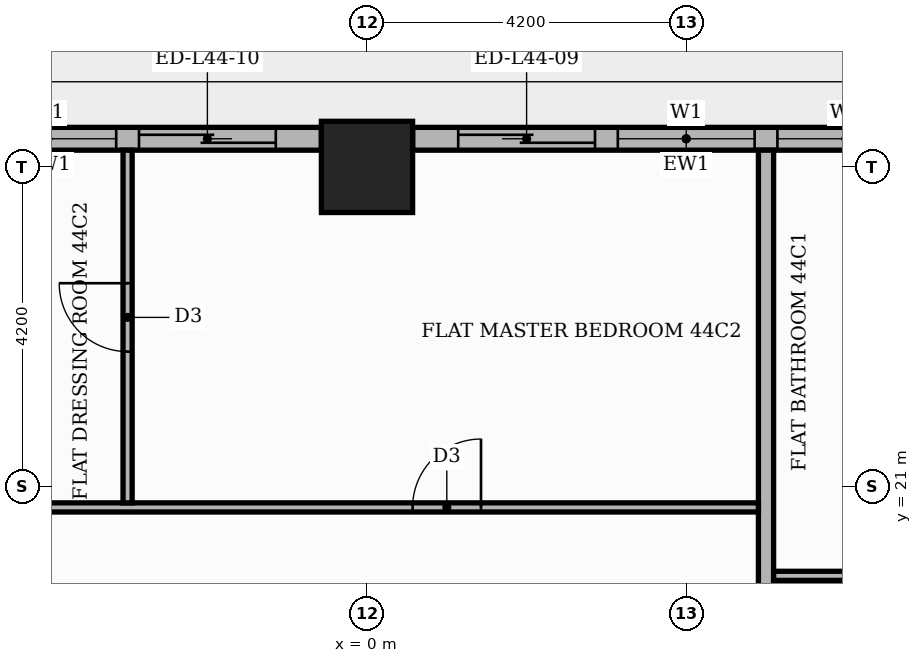
"""IFC4 building model, lengths in metres.
Left out: names, types, materials, properties, quantities, classifications, styles, units other than length and angle.
Written with IfcOpenShell. Run it as: python <this file> out.ifc"""

import sys

from ifc_helpers import new_model, si_unit, direction, frame, frame_2d, origin, origin_2d, place, context, subcontext, project, spatial, rectangle, extrude, element, fill, save


model = new_model("IFC4")
c1 = context("Model", 3, precision=1e-05, world=origin(), true_north=direction((0.0, 1.0)))
c2 = subcontext(c1, "Body", "Model", "MODEL_VIEW")
j1 = project(units=[si_unit("LENGTHUNIT", "METRE"), si_unit("PLANEANGLEUNIT", "RADIAN")], contexts=[c1])
p1 = place(None, origin())
s1 = spatial("IfcSite", under=j1, at=p1, CompositionType="ELEMENT")
p2 = place(p1, origin())
s2 = spatial("IfcBuilding", under=s1, at=p2, CompositionType="ELEMENT")
p3 = place(p2, frame((0.0, 0.0, 188.4)))
s3 = spatial("IfcBuildingStorey", under=s2, at=p3, CompositionType="ELEMENT", Elevation=188.4)
p4 = place(p3, frame((0.0, 25.2, -0.42), z_axis=(0.0, 0.0, 1.0), x_axis=(1.0, 0.0, 0.0)))
e1 = element("IfcColumn", 1, at=p4, inside=s3, PredefinedType="COLUMN", context=c2, shape_type="SweptSolid", body=[
    extrude(rectangle(XDim=1.2, YDim=1.2, at=origin_2d()), origin(), (0.0, 0.0, 1.0), 4.32),
])
p5 = place(p3, frame((7.8, 25.57, 0.0), z_axis=(0.0, 0.0, 1.0), x_axis=(-1.0, 0.0, 0.0)))
e2 = element("IfcWall", 2, at=p5, inside=s3, PredefinedType="STANDARD", context=c2, shape_type="SweptSolid", body=[
    extrude(rectangle(XDim=7.2, YDim=0.3, at=frame_2d((3.6, 0.0))), origin(), (0.0, 0.0, 1.0), 3.48),
])
p6 = place(p5, frame((0.6, 0.0, 0.9)))
e3 = element("IfcOpeningElement", 3, at=p6, cuts=e2, PredefinedType="OPENING", context=c2, shape_type="SweptSolid", body=[
    extrude(rectangle(XDim=1.8, YDim=2.1, at=frame_2d((0.9, 1.05))), frame((0.0, 0.16, 0.0), z_axis=(0.0, -1.0, 0.0), x_axis=(1.0, 0.0, 0.0)), (0.0, 0.0, 1.0), 0.32),
])
p7 = place(p5, frame((2.7, 0.0, 0.9)))
e4 = element("IfcOpeningElement", 4, at=p7, cuts=e2, PredefinedType="OPENING", context=c2, shape_type="SweptSolid", body=[
    extrude(rectangle(XDim=1.8, YDim=2.1, at=frame_2d((0.9, 1.05))), frame((0.0, 0.16, 0.0), z_axis=(0.0, -1.0, 0.0), x_axis=(1.0, 0.0, 0.0)), (0.0, 0.0, 1.0), 0.32),
])
p8 = place(p5, frame((4.8, 0.0, 0.0)))
e5 = element("IfcOpeningElement", 5, at=p8, cuts=e2, PredefinedType="OPENING", context=c2, shape_type="SweptSolid", body=[
    extrude(rectangle(XDim=1.8, YDim=2.4, at=frame_2d((0.9, 1.2))), frame((0.0, 0.16, 0.0), z_axis=(0.0, -1.0, 0.0), x_axis=(1.0, 0.0, 0.0)), (0.0, 0.0, 1.0), 0.32),
])
p9 = place(p3, frame((-0.6, 25.57, 0.0), z_axis=(0.0, 0.0, 1.0), x_axis=(-1.0, 0.0, 0.0)))
e6 = element("IfcWall", 6, at=p9, inside=s3, PredefinedType="STANDARD", context=c2, shape_type="SweptSolid", body=[
    extrude(rectangle(XDim=7.2, YDim=0.3, at=frame_2d((3.6, 0.0))), origin(), (0.0, 0.0, 1.0), 3.48),
])
p10 = place(p9, frame((0.6, 0.0, 0.0)))
e7 = element("IfcOpeningElement", 7, at=p10, cuts=e6, PredefinedType="OPENING", context=c2, shape_type="SweptSolid", body=[
    extrude(rectangle(XDim=1.8, YDim=2.4, at=frame_2d((0.9, 1.2))), frame((0.0, 0.16, 0.0), z_axis=(0.0, -1.0, 0.0), x_axis=(1.0, 0.0, 0.0)), (0.0, 0.0, 1.0), 0.32),
])
p11 = place(p9, frame((2.7, 0.0, 0.9)))
e8 = element("IfcOpeningElement", 8, at=p11, cuts=e6, PredefinedType="OPENING", context=c2, shape_type="SweptSolid", body=[
    extrude(rectangle(XDim=1.8, YDim=2.1, at=frame_2d((0.9, 1.05))), frame((0.0, 0.16, 0.0), z_axis=(0.0, -1.0, 0.0), x_axis=(1.0, 0.0, 0.0)), (0.0, 0.0, 1.0), 0.32),
])
p12 = place(p9, frame((4.8, 0.0, 0.9)))
e9 = element("IfcOpeningElement", 9, at=p12, cuts=e6, PredefinedType="OPENING", context=c2, shape_type="SweptSolid", body=[
    extrude(rectangle(XDim=1.8, YDim=2.1, at=frame_2d((0.9, 1.05))), frame((0.0, 0.16, 0.0), z_axis=(0.0, -1.0, 0.0), x_axis=(1.0, 0.0, 0.0)), (0.0, 0.0, 1.0), 0.32),
])
p13 = place(p3, frame((5.25, 13.75, 0.0), z_axis=(0.0, 0.0, 1.0), x_axis=(0.0, 1.0, 0.0)))
e10 = element("IfcWall", 10, at=p13, inside=s3, PredefinedType="PARTITIONING", context=c2, shape_type="SweptSolid", body=[
    extrude(rectangle(XDim=11.67, YDim=0.2, at=frame_2d((5.835, 0.0))), origin(), (0.0, 0.0, 1.0), 3.48),
])
p14 = place(p3, frame((5.35, 19.82, 0.0), z_axis=(0.0, 0.0, 1.0), x_axis=(1.0, 0.0, 0.0)))
e11 = element("IfcWall", 11, at=p14, inside=s3, PredefinedType="PARTITIONING", context=c2, shape_type="SweptSolid", body=[
    extrude(rectangle(XDim=12.25, YDim=0.12, at=frame_2d((6.125, 0.0))), origin(), (0.0, 0.0, 1.0), 3.48),
])
p15 = place(p14, frame((8.85, 0.0, 0.0)))
e12 = element("IfcOpeningElement", 12, at=p15, cuts=e11, PredefinedType="OPENING", context=c2, shape_type="SweptSolid", body=[
    extrude(rectangle(XDim=1.0, YDim=2.1, at=frame_2d((0.5, 1.05))), frame((0.0, 0.07, 0.0), z_axis=(0.0, -1.0, 0.0), x_axis=(1.0, 0.0, 0.0)), (0.0, 0.0, 1.0), 0.14),
])
p16 = place(p14, frame((5.75, 0.0, 0.0)))
e13 = element("IfcOpeningElement", 13, at=p16, cuts=e11, PredefinedType="OPENING", context=c2, shape_type="SweptSolid", body=[
    extrude(rectangle(XDim=0.9, YDim=2.1, at=frame_2d((0.45, 1.05))), frame((0.0, 0.07, 0.0), z_axis=(0.0, -1.0, 0.0), x_axis=(1.0, 0.0, 0.0)), (0.0, 0.0, 1.0), 0.14),
])
p17 = place(p3, frame((-13.55, 20.72, 0.0), z_axis=(0.0, 0.0, 1.0), x_axis=(1.0, 0.0, 0.0)))
e14 = element("IfcWall", 14, at=p17, inside=s3, PredefinedType="PARTITIONING", context=c2, shape_type="SweptSolid", body=[
    extrude(rectangle(XDim=18.7, YDim=0.12, at=frame_2d((9.35, 0.0))), origin(), (0.0, 0.0, 1.0), 3.48),
])
p18 = place(p17, frame((14.15, 0.0, 0.0)))
e15 = element("IfcOpeningElement", 15, at=p18, cuts=e14, PredefinedType="OPENING", context=c2, shape_type="SweptSolid", body=[
    extrude(rectangle(XDim=0.9, YDim=2.1, at=frame_2d((0.45, 1.05))), frame((0.0, 0.07, 0.0), z_axis=(0.0, -1.0, 0.0), x_axis=(1.0, 0.0, 0.0)), (0.0, 0.0, 1.0), 0.14),
])
p19 = place(p17, frame((2.55, 0.0, 0.0)))
e16 = element("IfcOpeningElement", 16, at=p19, cuts=e14, PredefinedType="OPENING", context=c2, shape_type="SweptSolid", body=[
    extrude(rectangle(XDim=1.0, YDim=2.1, at=frame_2d((0.5, 1.05))), frame((0.0, 0.07, 0.0), z_axis=(0.0, -1.0, 0.0), x_axis=(1.0, 0.0, 0.0)), (0.0, 0.0, 1.0), 0.14),
])
p20 = place(p3, frame((-3.15, 20.78, 0.0), z_axis=(0.0, 0.0, 1.0), x_axis=(0.0, 1.0, 0.0)))
e17 = element("IfcWall", 17, at=p20, inside=s3, PredefinedType="PARTITIONING", context=c2, shape_type="SweptSolid", body=[
    extrude(rectangle(XDim=4.64, YDim=0.12, at=frame_2d((2.32, 0.0))), origin(), (0.0, 0.0, 1.0), 3.48),
])
p21 = place(p20, frame((1.99, 0.0, 0.0)))
e18 = element("IfcOpeningElement", 18, at=p21, cuts=e17, PredefinedType="OPENING", context=c2, shape_type="SweptSolid", body=[
    extrude(rectangle(XDim=0.9, YDim=2.1, at=frame_2d((0.45, 1.05))), frame((0.0, 0.07, 0.0), z_axis=(0.0, -1.0, 0.0), x_axis=(1.0, 0.0, 0.0)), (0.0, 0.0, 1.0), 0.14),
])
p22 = place(p6, origin())
e19 = element("IfcWindow", 19, at=p22, inside=s3, PartitioningType="SINGLE_PANEL", PredefinedType="WINDOW", context=c2, shape_type="SweptSolid", body=[
    extrude(rectangle(XDim=1.8, YDim=2.1, at=frame_2d((0.9, 1.05))), frame((0.0, 0.03, 0.0), z_axis=(0.0, -1.0, 0.0), x_axis=(1.0, 0.0, 0.0)), (0.0, 0.0, 1.0), 0.06),
])
fill(e3, e19)
p23 = place(p7, origin())
e20 = element("IfcWindow", 20, at=p23, inside=s3, PartitioningType="SINGLE_PANEL", PredefinedType="WINDOW", context=c2, shape_type="SweptSolid", body=[
    extrude(rectangle(XDim=1.8, YDim=2.1, at=frame_2d((0.9, 1.05))), frame((0.0, 0.03, 0.0), z_axis=(0.0, -1.0, 0.0), x_axis=(1.0, 0.0, 0.0)), (0.0, 0.0, 1.0), 0.06),
])
fill(e4, e20)
p24 = place(p8, origin())
e21 = element("IfcDoor", 21, at=p24, inside=s3, OperationType="SLIDING_TO_RIGHT", PredefinedType="DOOR", context=c2, shape_type="SweptSolid", body=[
    extrude(rectangle(XDim=1.8, YDim=2.4, at=frame_2d((0.9, 1.2))), frame((0.0, 0.025, 0.0), z_axis=(0.0, -1.0, 0.0), x_axis=(1.0, 0.0, 0.0)), (0.0, 0.0, 1.0), 0.05),
])
fill(e5, e21)
p25 = place(p10, origin())
e22 = element("IfcDoor", 22, at=p25, inside=s3, OperationType="SLIDING_TO_LEFT", PredefinedType="DOOR", context=c2, shape_type="SweptSolid", body=[
    extrude(rectangle(XDim=1.8, YDim=2.4, at=frame_2d((0.9, 1.2))), frame((0.0, 0.025, 0.0), z_axis=(0.0, -1.0, 0.0), x_axis=(1.0, 0.0, 0.0)), (0.0, 0.0, 1.0), 0.05),
])
fill(e7, e22)
p26 = place(p11, origin())
e23 = element("IfcWindow", 23, at=p26, inside=s3, PartitioningType="SINGLE_PANEL", PredefinedType="WINDOW", context=c2, shape_type="SweptSolid", body=[
    extrude(rectangle(XDim=1.8, YDim=2.1, at=frame_2d((0.9, 1.05))), frame((0.0, 0.03, 0.0), z_axis=(0.0, -1.0, 0.0), x_axis=(1.0, 0.0, 0.0)), (0.0, 0.0, 1.0), 0.06),
])
fill(e8, e23)
p27 = place(p18, origin())
e24 = element("IfcDoor", 24, at=p27, inside=s3, OperationType="SINGLE_SWING_RIGHT", PredefinedType="DOOR", context=c2, shape_type="SweptSolid", body=[
    extrude(rectangle(XDim=0.9, YDim=2.1, at=frame_2d((0.45, 1.05))), frame((0.0, 0.025, 0.0), z_axis=(0.0, -1.0, 0.0), x_axis=(1.0, 0.0, 0.0)), (0.0, 0.0, 1.0), 0.05),
])
fill(e15, e24)
p28 = place(p21, origin())
e25 = element("IfcDoor", 25, at=p28, inside=s3, OperationType="SINGLE_SWING_RIGHT", PredefinedType="DOOR", context=c2, shape_type="SweptSolid", body=[
    extrude(rectangle(XDim=0.9, YDim=2.1, at=frame_2d((0.45, 1.05))), frame((0.0, 0.025, 0.0), z_axis=(0.0, -1.0, 0.0), x_axis=(1.0, 0.0, 0.0)), (0.0, 0.0, 1.0), 0.05),
])
fill(e18, e25)
save(model, sys.argv[1])
